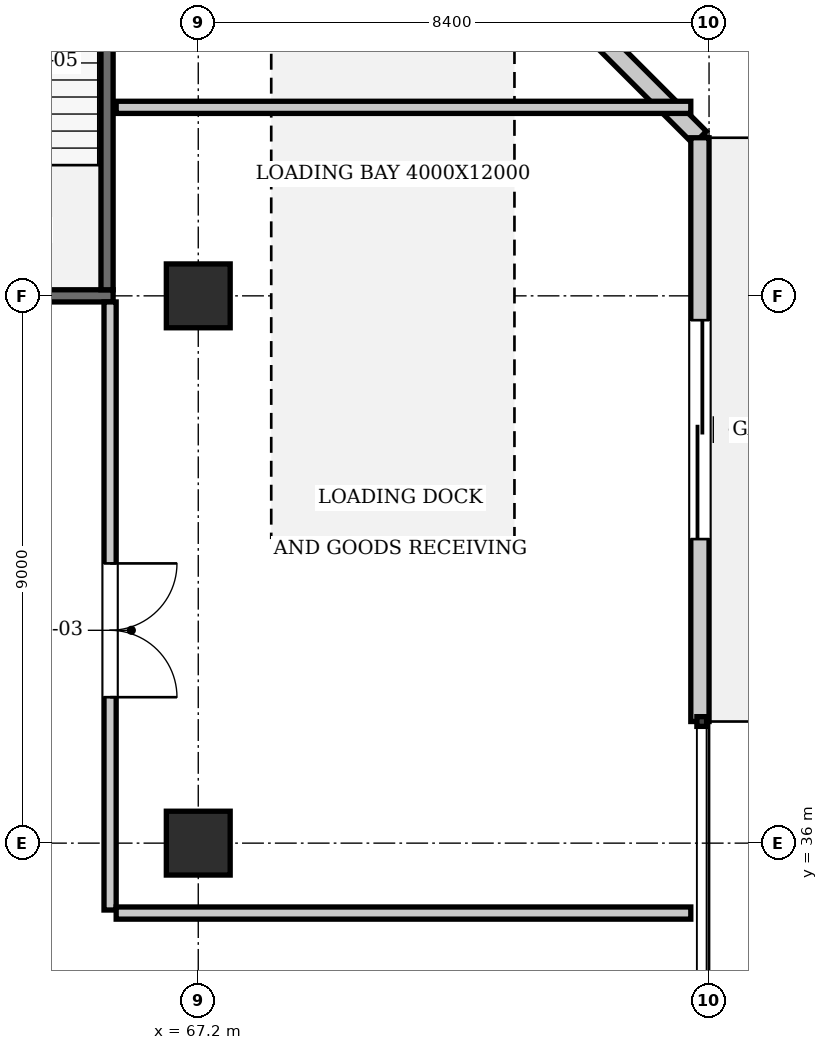
"""IFC4 building model, lengths in metres.
Left out: names, types, materials, properties, quantities, classifications, styles, units other than length and angle.
Written with IfcOpenShell. Run it as: python <this file> out.ifc"""

import sys

from ifc_helpers import new_model, si_unit, direction, frame, frame_2d, origin, origin_2d, place, context, subcontext, project, spatial, rectangle, extrude, element, fill, save


model = new_model("IFC4")
c1 = context("Model", 3, precision=1e-05, world=origin(), true_north=direction((0.0, 1.0)))
c2 = subcontext(c1, "Body", "Model", "MODEL_VIEW")
j1 = project(units=[si_unit("LENGTHUNIT", "METRE"), si_unit("PLANEANGLEUNIT", "RADIAN")], contexts=[c1])
p1 = place(None, origin())
s1 = spatial("IfcSite", under=j1, at=p1, CompositionType="ELEMENT")
p2 = place(p1, origin())
s2 = spatial("IfcBuilding", under=s1, at=p2, CompositionType="ELEMENT")
p3 = place(p2, origin())
s3 = spatial("IfcBuildingStorey", under=s2, at=p3, CompositionType="ELEMENT", Elevation=0.0)
for number, where, z_axis, x_axis in (
    (1, (67.2, 36.0, 0.0), (0.0, 0.0, 1.0), (1.0, 0.0, 0.0)),
    (2, (67.2, 45.0, 0.0), (0.0, 0.0, 1.0), (1.0, 0.0, 0.0)),
):
    element("IfcColumn", number, at=place(p3, frame(where, z_axis=z_axis, x_axis=x_axis)), inside=s3, PredefinedType="COLUMN", context=c2, shape_type="SweptSolid", body=[
        extrude(rectangle(XDim=1.05, YDim=1.05, at=origin_2d()), origin(), (0.0, 0.0, 1.0), 5.6),
    ])
p4 = place(p3, frame((61.75, 45.0, 0.0), z_axis=(0.0, 0.0, 1.0), x_axis=(1.0, 0.0, 0.0)))
e3 = element("IfcWall", 3, at=p4, inside=s3, PredefinedType="SOLIDWALL", context=c2, shape_type="SweptSolid", body=[
    extrude(rectangle(XDim=4.05, YDim=0.2, at=frame_2d((2.025, 0.0))), origin(), (0.0, 0.0, 1.0), 4.685),
])
p5 = place(p3, frame((65.7, 45.1, 0.0), z_axis=(0.0, 0.0, 1.0), x_axis=(0.0, 1.0, 0.0)))
e4 = element("IfcWall", 4, at=p5, inside=s3, PredefinedType="SOLIDWALL", context=c2, shape_type="SweptSolid", body=[
    extrude(rectangle(XDim=8.1, YDim=0.2, at=frame_2d((4.05, 0.0))), origin(), (0.0, 0.0, 1.0), 5.32),
])
p6 = place(p3, frame((75.45, 47.6, 0.0), z_axis=(0.0, 0.0, 1.0), x_axis=(-0.707106781187, 0.707106781187, 0.0)))
e5 = element("IfcWall", 5, at=p6, inside=s3, PredefinedType="SOLIDWALL", context=c2, shape_type="SweptSolid", body=[
    extrude(rectangle(XDim=8.839, YDim=0.3, at=frame_2d((4.419, 0.0))), origin(), (0.0, 0.0, 1.0), 5.32),
])
p7 = place(p6, frame((3.2, 0.0, 0.9)))
e6 = element("IfcOpeningElement", 6, at=p7, cuts=e5, PredefinedType="OPENING", context=c2, shape_type="SweptSolid", body=[
    extrude(rectangle(XDim=2.4, YDim=2.6, at=frame_2d((1.2, 1.3))), frame((0.0, 0.16, 0.0), z_axis=(0.0, -1.0, 0.0), x_axis=(1.0, 0.0, 0.0)), (0.0, 0.0, 1.0), 0.32),
])
p8 = place(p3, frame((75.45, 47.6, 0.0), z_axis=(0.0, 0.0, 1.0), x_axis=(0.0, -1.0, 0.0)))
e7 = element("IfcWall", 7, at=p8, inside=s3, PredefinedType="SOLIDWALL", context=c2, shape_type="SweptSolid", body=[
    extrude(rectangle(XDim=9.6, YDim=0.3, at=frame_2d((4.8, 0.0))), origin(), (0.0, 0.0, 1.0), 5.32),
])
p9 = place(p8, frame((3.0, 0.0, 0.0)))
e8 = element("IfcOpeningElement", 8, at=p9, cuts=e7, PredefinedType="OPENING", context=c2, shape_type="SweptSolid", body=[
    extrude(rectangle(XDim=3.6, YDim=3.2, at=frame_2d((1.8, 1.6))), frame((0.0, 0.16, 0.0), z_axis=(0.0, -1.0, 0.0), x_axis=(1.0, 0.0, 0.0)), (0.0, 0.0, 1.0), 0.32),
])
p10 = place(p3, frame((65.75, 34.9, 0.0), z_axis=(0.0, 0.0, 1.0), x_axis=(0.0, 1.0, 0.0)))
e9 = element("IfcWall", 9, at=p10, inside=s3, PredefinedType="PARTITIONING", context=c2, shape_type="SweptSolid", body=[
    extrude(rectangle(XDim=10.0, YDim=0.2, at=frame_2d((5.0, 0.0))), origin(), (0.0, 0.0, 1.0), 5.32),
])
p11 = place(p10, frame((3.5, 0.0, 0.0)))
e10 = element("IfcOpeningElement", 10, at=p11, cuts=e9, PredefinedType="OPENING", context=c2, shape_type="SweptSolid", body=[
    extrude(rectangle(XDim=2.2, YDim=2.4, at=frame_2d((1.1, 1.2))), frame((0.0, 0.11, 0.0), z_axis=(0.0, -1.0, 0.0), x_axis=(1.0, 0.0, 0.0)), (0.0, 0.0, 1.0), 0.22),
])
for number, where, z_axis, x_axis in (
    (11, (65.85, 48.1, 0.0), (0.0, 0.0, 1.0), (1.0, 0.0, 0.0)),
    (12, (65.85, 34.85, 0.0), (0.0, 0.0, 1.0), (1.0, 0.0, 0.0)),
):
    element("IfcWall", number, at=place(p3, frame(where, z_axis=z_axis, x_axis=x_axis)), inside=s3, PredefinedType="PARTITIONING", context=c2, shape_type="SweptSolid", body=[
        extrude(rectangle(XDim=9.45, YDim=0.2, at=frame_2d((4.725, 0.0))), origin(), (0.0, 0.0, 1.0), 5.32),
    ])
p12 = place(p9, origin())
e13 = element("IfcDoor", 13, at=p12, inside=s3, OperationType="ROLLINGUP", PredefinedType="GATE", context=c2, shape_type="SweptSolid", body=[
    extrude(rectangle(XDim=3.6, YDim=3.2, at=frame_2d((1.8, 1.6))), frame((0.0, 0.025, 0.0), z_axis=(0.0, -1.0, 0.0), x_axis=(1.0, 0.0, 0.0)), (0.0, 0.0, 1.0), 0.05),
])
fill(e8, e13)
p13 = place(p11, frame((2.2, 0.0, 0.0), z_axis=(0.0, 0.0, 1.0), x_axis=(-1.0, 0.0, 0.0)))
e14 = element("IfcDoor", 14, at=p13, inside=s3, OperationType="DOUBLE_DOOR_SINGLE_SWING", PredefinedType="GATE", context=c2, shape_type="SweptSolid", body=[
    extrude(rectangle(XDim=2.2, YDim=2.4, at=frame_2d((1.1, 1.2))), frame((0.0, 0.025, 0.0), z_axis=(0.0, -1.0, 0.0), x_axis=(1.0, 0.0, 0.0)), (0.0, 0.0, 1.0), 0.05),
])
fill(e10, e14)
save(model, sys.argv[1])
